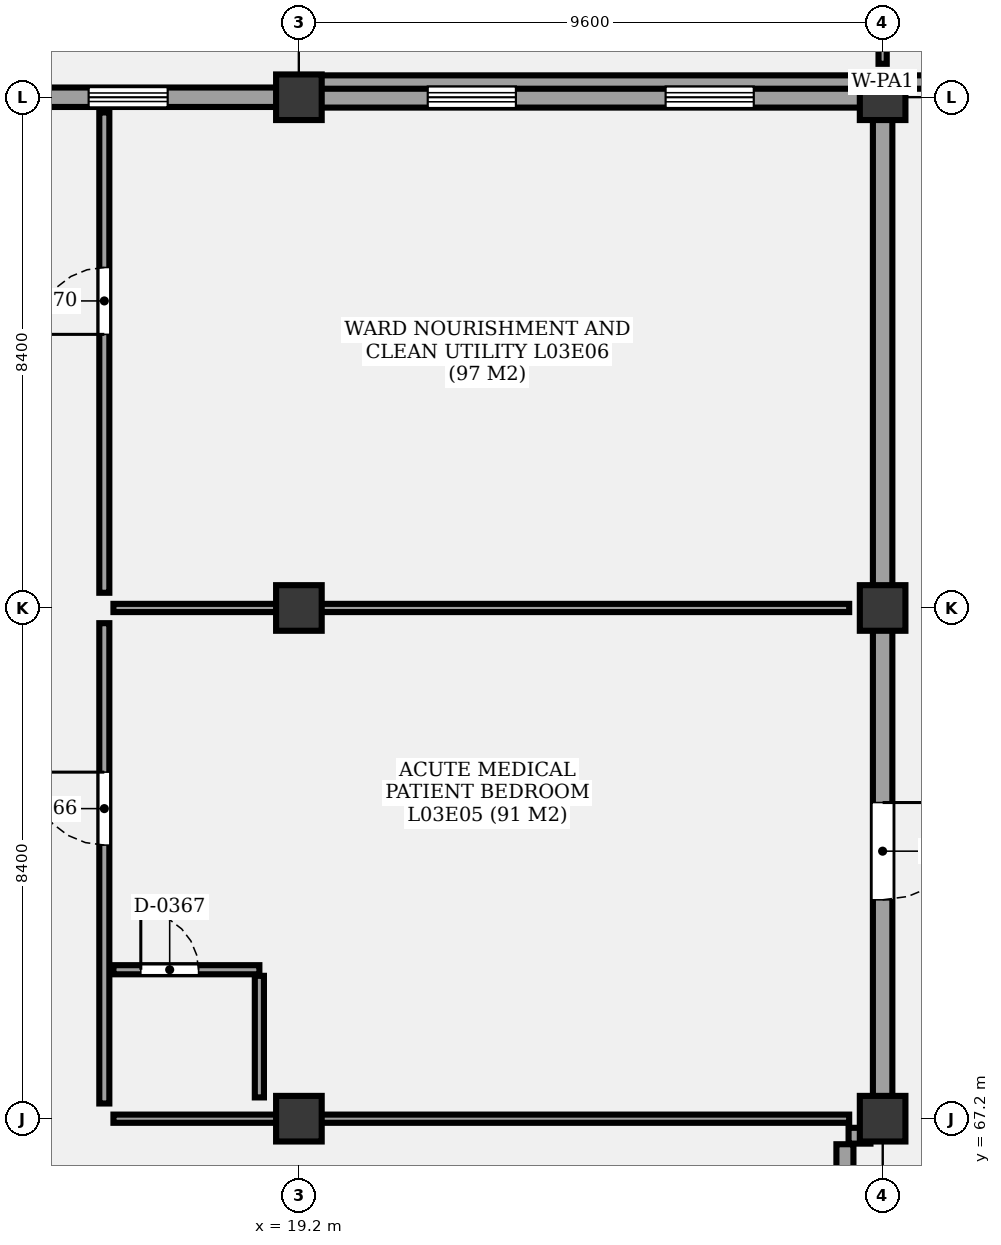
"""IFC4 building model, lengths in metres.
Left out: names, types, materials, properties, quantities, classifications, styles, units other than length and angle.
Written with IfcOpenShell. Run it as: python <this file> out.ifc"""

import sys

from ifc_helpers import new_model, si_unit, direction, frame, frame_2d, origin, origin_2d, place, context, subcontext, project, spatial, rectangle, extrude, element, fill, save


model = new_model("IFC4")
c1 = context("Model", 3, precision=1e-05, world=origin(), true_north=direction((0.0, 1.0)))
c2 = subcontext(c1, "Body", "Model", "MODEL_VIEW")
j1 = project(units=[si_unit("LENGTHUNIT", "METRE"), si_unit("PLANEANGLEUNIT", "RADIAN")], contexts=[c1])
p1 = place(None, origin())
s1 = spatial("IfcSite", under=j1, at=p1, CompositionType="ELEMENT")
p2 = place(p1, origin())
s2 = spatial("IfcBuilding", under=s1, at=p2, CompositionType="ELEMENT")
p3 = place(p2, frame((0.0, 0.0, 13.5)))
s3 = spatial("IfcBuildingStorey", under=s2, at=p3, CompositionType="ELEMENT", Elevation=13.5)
for number, where, z_axis, x_axis in (
    (1, (19.2, 67.2, 0.0), (0.0, 0.0, 1.0), (1.0, 0.0, 0.0)),
    (2, (19.2, 75.6, 0.0), (0.0, 0.0, 1.0), (1.0, 0.0, 0.0)),
    (3, (19.2, 84.0, 0.0), (0.0, 0.0, 1.0), (1.0, 0.0, 0.0)),
    (4, (28.8, 67.2, 0.0), (0.0, 0.0, 1.0), (1.0, 0.0, 0.0)),
    (5, (28.8, 75.6, 0.0), (0.0, 0.0, 1.0), (1.0, 0.0, 0.0)),
    (6, (28.8, 84.0, 0.0), (0.0, 0.0, 1.0), (1.0, 0.0, 0.0)),
):
    element("IfcColumn", number, at=place(p3, frame(where, z_axis=z_axis, x_axis=x_axis)), inside=s3, PredefinedType="COLUMN", context=c2, shape_type="SweptSolid", body=[
        extrude(rectangle(XDim=0.75, YDim=0.75, at=origin_2d()), origin(), (0.0, 0.0, 1.0), 4.3),
    ])
p4 = place(p3, frame((9.6, 84.0, 0.0), z_axis=(0.0, 0.0, 1.0), x_axis=(1.0, 0.0, 0.0)))
e7 = element("IfcWall", 7, at=p4, inside=s3, PredefinedType="SOLIDWALL", context=c2, shape_type="SweptSolid", body=[
    extrude(rectangle(XDim=9.6, YDim=0.32, at=frame_2d((4.8, 0.0))), origin(), (0.0, 0.0, 1.0), 3.49),
])
p5 = place(p4, frame((2.158, 0.0, 0.85)))
e8 = element("IfcOpeningElement", 8, at=p5, cuts=e7, PredefinedType="OPENING", context=c2, shape_type="SweptSolid", body=[
    extrude(rectangle(XDim=1.3, YDim=1.2, at=frame_2d((0.65, 0.6))), frame((0.0, 0.17, 0.0), z_axis=(0.0, -1.0, 0.0), x_axis=(1.0, 0.0, 0.0)), (0.0, 0.0, 1.0), 0.34),
])
p6 = place(p4, frame((6.142, 0.0, 0.85)))
e9 = element("IfcOpeningElement", 9, at=p6, cuts=e7, PredefinedType="OPENING", context=c2, shape_type="SweptSolid", body=[
    extrude(rectangle(XDim=1.3, YDim=1.2, at=frame_2d((0.65, 0.6))), frame((0.0, 0.17, 0.0), z_axis=(0.0, -1.0, 0.0), x_axis=(1.0, 0.0, 0.0)), (0.0, 0.0, 1.0), 0.34),
])
p7 = place(p3, frame((19.2, 84.0, 0.0), z_axis=(0.0, 0.0, 1.0), x_axis=(1.0, 0.0, 0.0)))
e10 = element("IfcWall", 10, at=p7, inside=s3, PredefinedType="SOLIDWALL", context=c2, shape_type="SweptSolid", body=[
    extrude(rectangle(XDim=9.6, YDim=0.34, at=frame_2d((4.8, 0.0))), origin(), (0.0, 0.0, 1.0), 3.49),
])
p8 = place(p7, frame((2.119, 0.0, 0.85)))
e11 = element("IfcOpeningElement", 11, at=p8, cuts=e10, PredefinedType="OPENING", context=c2, shape_type="SweptSolid", body=[
    extrude(rectangle(XDim=1.45, YDim=1.2, at=frame_2d((0.725, 0.6))), frame((0.0, 0.18, 0.0), z_axis=(0.0, -1.0, 0.0), x_axis=(1.0, 0.0, 0.0)), (0.0, 0.0, 1.0), 0.36),
])
p9 = place(p7, frame((6.031, 0.0, 0.85)))
e12 = element("IfcOpeningElement", 12, at=p9, cuts=e10, PredefinedType="OPENING", context=c2, shape_type="SweptSolid", body=[
    extrude(rectangle(XDim=1.45, YDim=1.2, at=frame_2d((0.725, 0.6))), frame((0.0, 0.18, 0.0), z_axis=(0.0, -1.0, 0.0), x_axis=(1.0, 0.0, 0.0)), (0.0, 0.0, 1.0), 0.36),
])
p10 = place(p3, frame((28.6, 66.92, 0.0), z_axis=(0.0, 0.0, 1.0), x_axis=(-1.0, 0.0, 0.0)))
e13 = element("IfcWall", 13, at=p10, inside=s3, PredefinedType="SOLIDWALL", context=c2, shape_type="SweptSolid", body=[
    extrude(rectangle(XDim=0.36, YDim=0.26, at=frame_2d((0.18, 0.0))), origin(), (0.0, 0.0, 1.0), 3.49),
])
p11 = place(p3, frame((28.18, 66.78, 0.0), z_axis=(0.0, 0.0, 1.0), x_axis=(0.0, -1.0, 0.0)))
e14 = element("IfcWall", 14, at=p11, inside=s3, PredefinedType="SOLIDWALL", context=c2, shape_type="SweptSolid", body=[
    extrude(rectangle(XDim=1.995, YDim=0.28, at=frame_2d((0.998, 0.0))), origin(), (0.0, 0.0, 1.0), 3.49),
])
p12 = place(p3, frame((28.8, 83.84, 0.0), z_axis=(0.0, 0.0, 1.0), x_axis=(0.0, -1.0, 0.0)))
e15 = element("IfcWall", 15, at=p12, inside=s3, PredefinedType="SOLIDWALL", context=c2, shape_type="SweptSolid", body=[
    extrude(rectangle(XDim=16.64, YDim=0.32, at=frame_2d((8.32, 0.0))), origin(), (0.0, 0.0, 1.0), 3.49),
])
p13 = place(p12, frame((11.44, 0.0, 0.0)))
e16 = element("IfcOpeningElement", 16, at=p13, cuts=e15, PredefinedType="OPENING", context=c2, shape_type="SweptSolid", body=[
    extrude(rectangle(XDim=1.6, YDim=2.3, at=frame_2d((0.8, 1.15))), frame((0.0, 0.17, 0.0), z_axis=(0.0, -1.0, 0.0), x_axis=(1.0, 0.0, 0.0)), (0.0, 0.0, 1.0), 0.34),
])
p14 = place(p3, frame((19.4, 84.25, 0.0), z_axis=(0.0, 0.0, 1.0), x_axis=(1.0, 0.0, 0.0)))
e17 = element("IfcWall", 17, at=p14, inside=s3, PredefinedType="PARAPET", context=c2, shape_type="SweptSolid", body=[
    extrude(rectangle(XDim=18.8, YDim=0.22, at=frame_2d((9.4, 0.0))), origin(), (0.0, 0.0, 1.0), 1.15),
])
p15 = place(p3, frame((28.8, 84.55, 0.0), z_axis=(0.0, 0.0, 1.0), x_axis=(0.0, 1.0, 0.0)))
e18 = element("IfcWall", 18, at=p15, inside=s3, PredefinedType="PARTITIONING", context=c2, shape_type="SweptSolid", body=[
    extrude(rectangle(XDim=17.3, YDim=0.135, at=frame_2d((8.65, 0.0))), origin(), (0.0, 0.0, 1.0), 3.4),
])
p16 = place(p3, frame((16.0, 67.45, 0.0), z_axis=(0.0, 0.0, 1.0), x_axis=(0.0, 1.0, 0.0)))
e19 = element("IfcWall", 19, at=p16, inside=s3, PredefinedType="PARTITIONING", context=c2, shape_type="SweptSolid", body=[
    extrude(rectangle(XDim=7.9, YDim=0.165, at=frame_2d((3.95, 0.0))), origin(), (0.0, 0.0, 1.0), 3.4),
])
p17 = place(p16, frame((4.25, 0.0, 0.0)))
e20 = element("IfcOpeningElement", 20, at=p17, cuts=e19, PredefinedType="OPENING", context=c2, shape_type="SweptSolid", body=[
    extrude(rectangle(XDim=1.2, YDim=2.2, at=frame_2d((0.6, 1.1))), frame((0.0, 0.093, 0.0), z_axis=(0.0, -1.0, 0.0), x_axis=(1.0, 0.0, 0.0)), (0.0, 0.0, 1.0), 0.185),
])
p18 = place(p3, frame((16.15, 69.65, 0.0), z_axis=(0.0, 0.0, 1.0), x_axis=(1.0, 0.0, 0.0)))
e21 = element("IfcWall", 21, at=p18, inside=s3, PredefinedType="PARTITIONING", context=c2, shape_type="SweptSolid", body=[
    extrude(rectangle(XDim=2.4, YDim=0.15, at=frame_2d((1.2, 0.0))), origin(), (0.0, 0.0, 1.0), 3.4),
])
p19 = place(p18, frame((0.45, 0.0, 0.0)))
e22 = element("IfcOpeningElement", 22, at=p19, cuts=e21, PredefinedType="OPENING", context=c2, shape_type="SweptSolid", body=[
    extrude(rectangle(XDim=0.95, YDim=2.1, at=frame_2d((0.475, 1.05))), frame((0.0, 0.085, 0.0), z_axis=(0.0, -1.0, 0.0), x_axis=(1.0, 0.0, 0.0)), (0.0, 0.0, 1.0), 0.17),
])
p20 = place(p3, frame((18.55, 67.55, 0.0), z_axis=(0.0, 0.0, 1.0), x_axis=(0.0, 1.0, 0.0)))
e23 = element("IfcWall", 23, at=p20, inside=s3, PredefinedType="PARTITIONING", context=c2, shape_type="SweptSolid", body=[
    extrude(rectangle(XDim=2.0, YDim=0.15, at=frame_2d((1.0, 0.0))), origin(), (0.0, 0.0, 1.0), 3.4),
])
p21 = place(p3, frame((16.15, 67.2, 0.0), z_axis=(0.0, 0.0, 1.0), x_axis=(1.0, 0.0, 0.0)))
e24 = element("IfcWall", 24, at=p21, inside=s3, PredefinedType="PARTITIONING", context=c2, shape_type="SweptSolid", body=[
    extrude(rectangle(XDim=12.1, YDim=0.135, at=frame_2d((6.05, 0.0))), origin(), (0.0, 0.0, 1.0), 3.4),
])
p22 = place(p3, frame((16.0, 75.85, 0.0), z_axis=(0.0, 0.0, 1.0), x_axis=(0.0, 1.0, 0.0)))
e25 = element("IfcWall", 25, at=p22, inside=s3, PredefinedType="PARTITIONING", context=c2, shape_type="SweptSolid", body=[
    extrude(rectangle(XDim=7.9, YDim=0.165, at=frame_2d((3.95, 0.0))), origin(), (0.0, 0.0, 1.0), 3.4),
])
p23 = place(p22, frame((4.25, 0.0, 0.0)))
e26 = element("IfcOpeningElement", 26, at=p23, cuts=e25, PredefinedType="OPENING", context=c2, shape_type="SweptSolid", body=[
    extrude(rectangle(XDim=1.1, YDim=2.4, at=frame_2d((0.55, 1.2))), frame((0.0, 0.093, 0.0), z_axis=(0.0, -1.0, 0.0), x_axis=(1.0, 0.0, 0.0)), (0.0, 0.0, 1.0), 0.185),
])
p24 = place(p3, frame((16.15, 75.6, 0.0), z_axis=(0.0, 0.0, 1.0), x_axis=(1.0, 0.0, 0.0)))
e27 = element("IfcWall", 27, at=p24, inside=s3, PredefinedType="PARTITIONING", context=c2, shape_type="SweptSolid", body=[
    extrude(rectangle(XDim=12.1, YDim=0.135, at=frame_2d((6.05, 0.0))), origin(), (0.0, 0.0, 1.0), 3.4),
])
p25 = place(p6, origin())
e28 = element("IfcWindow", 28, at=p25, inside=s3, PartitioningType="SINGLE_PANEL", PredefinedType="WINDOW", context=c2, shape_type="SweptSolid", body=[
    extrude(rectangle(XDim=1.3, YDim=1.2, at=frame_2d((0.65, 0.6))), frame((0.0, 0.03, 0.0), z_axis=(0.0, -1.0, 0.0), x_axis=(1.0, 0.0, 0.0)), (0.0, 0.0, 1.0), 0.06),
])
fill(e9, e28)
p26 = place(p8, origin())
e29 = element("IfcWindow", 29, at=p26, inside=s3, PartitioningType="SINGLE_PANEL", PredefinedType="WINDOW", context=c2, shape_type="SweptSolid", body=[
    extrude(rectangle(XDim=1.45, YDim=1.2, at=frame_2d((0.725, 0.6))), frame((0.0, 0.03, 0.0), z_axis=(0.0, -1.0, 0.0), x_axis=(1.0, 0.0, 0.0)), (0.0, 0.0, 1.0), 0.06),
])
fill(e11, e29)
p27 = place(p9, origin())
e30 = element("IfcWindow", 30, at=p27, inside=s3, PartitioningType="SINGLE_PANEL", PredefinedType="WINDOW", context=c2, shape_type="SweptSolid", body=[
    extrude(rectangle(XDim=1.45, YDim=1.2, at=frame_2d((0.725, 0.6))), frame((0.0, 0.03, 0.0), z_axis=(0.0, -1.0, 0.0), x_axis=(1.0, 0.0, 0.0)), (0.0, 0.0, 1.0), 0.06),
])
fill(e12, e30)
p28 = place(p13, origin())
e31 = element("IfcDoor", 31, at=p28, inside=s3, OperationType="SINGLE_SWING_LEFT", PredefinedType="DOOR", context=c2, shape_type="SweptSolid", body=[
    extrude(rectangle(XDim=1.6, YDim=2.3, at=frame_2d((0.8, 1.15))), frame((0.0, 0.025, 0.0), z_axis=(0.0, -1.0, 0.0), x_axis=(1.0, 0.0, 0.0)), (0.0, 0.0, 1.0), 0.05),
])
fill(e16, e31)
p29 = place(p17, origin())
e32 = element("IfcDoor", 32, at=p29, inside=s3, OperationType="SINGLE_SWING_RIGHT", PredefinedType="DOOR", context=c2, shape_type="SweptSolid", body=[
    extrude(rectangle(XDim=1.2, YDim=2.2, at=frame_2d((0.6, 1.1))), frame((0.0, 0.025, 0.0), z_axis=(0.0, -1.0, 0.0), x_axis=(1.0, 0.0, 0.0)), (0.0, 0.0, 1.0), 0.05),
])
fill(e20, e32)
p30 = place(p19, origin())
e33 = element("IfcDoor", 33, at=p30, inside=s3, OperationType="SINGLE_SWING_LEFT", PredefinedType="DOOR", context=c2, shape_type="SweptSolid", body=[
    extrude(rectangle(XDim=0.95, YDim=2.1, at=frame_2d((0.475, 1.05))), frame((0.0, 0.025, 0.0), z_axis=(0.0, -1.0, 0.0), x_axis=(1.0, 0.0, 0.0)), (0.0, 0.0, 1.0), 0.05),
])
fill(e22, e33)
p31 = place(p23, origin())
e34 = element("IfcDoor", 34, at=p31, inside=s3, OperationType="SINGLE_SWING_LEFT", PredefinedType="DOOR", context=c2, shape_type="SweptSolid", body=[
    extrude(rectangle(XDim=1.1, YDim=2.4, at=frame_2d((0.55, 1.2))), frame((0.0, 0.025, 0.0), z_axis=(0.0, -1.0, 0.0), x_axis=(1.0, 0.0, 0.0)), (0.0, 0.0, 1.0), 0.05),
])
fill(e26, e34)
save(model, sys.argv[1])
